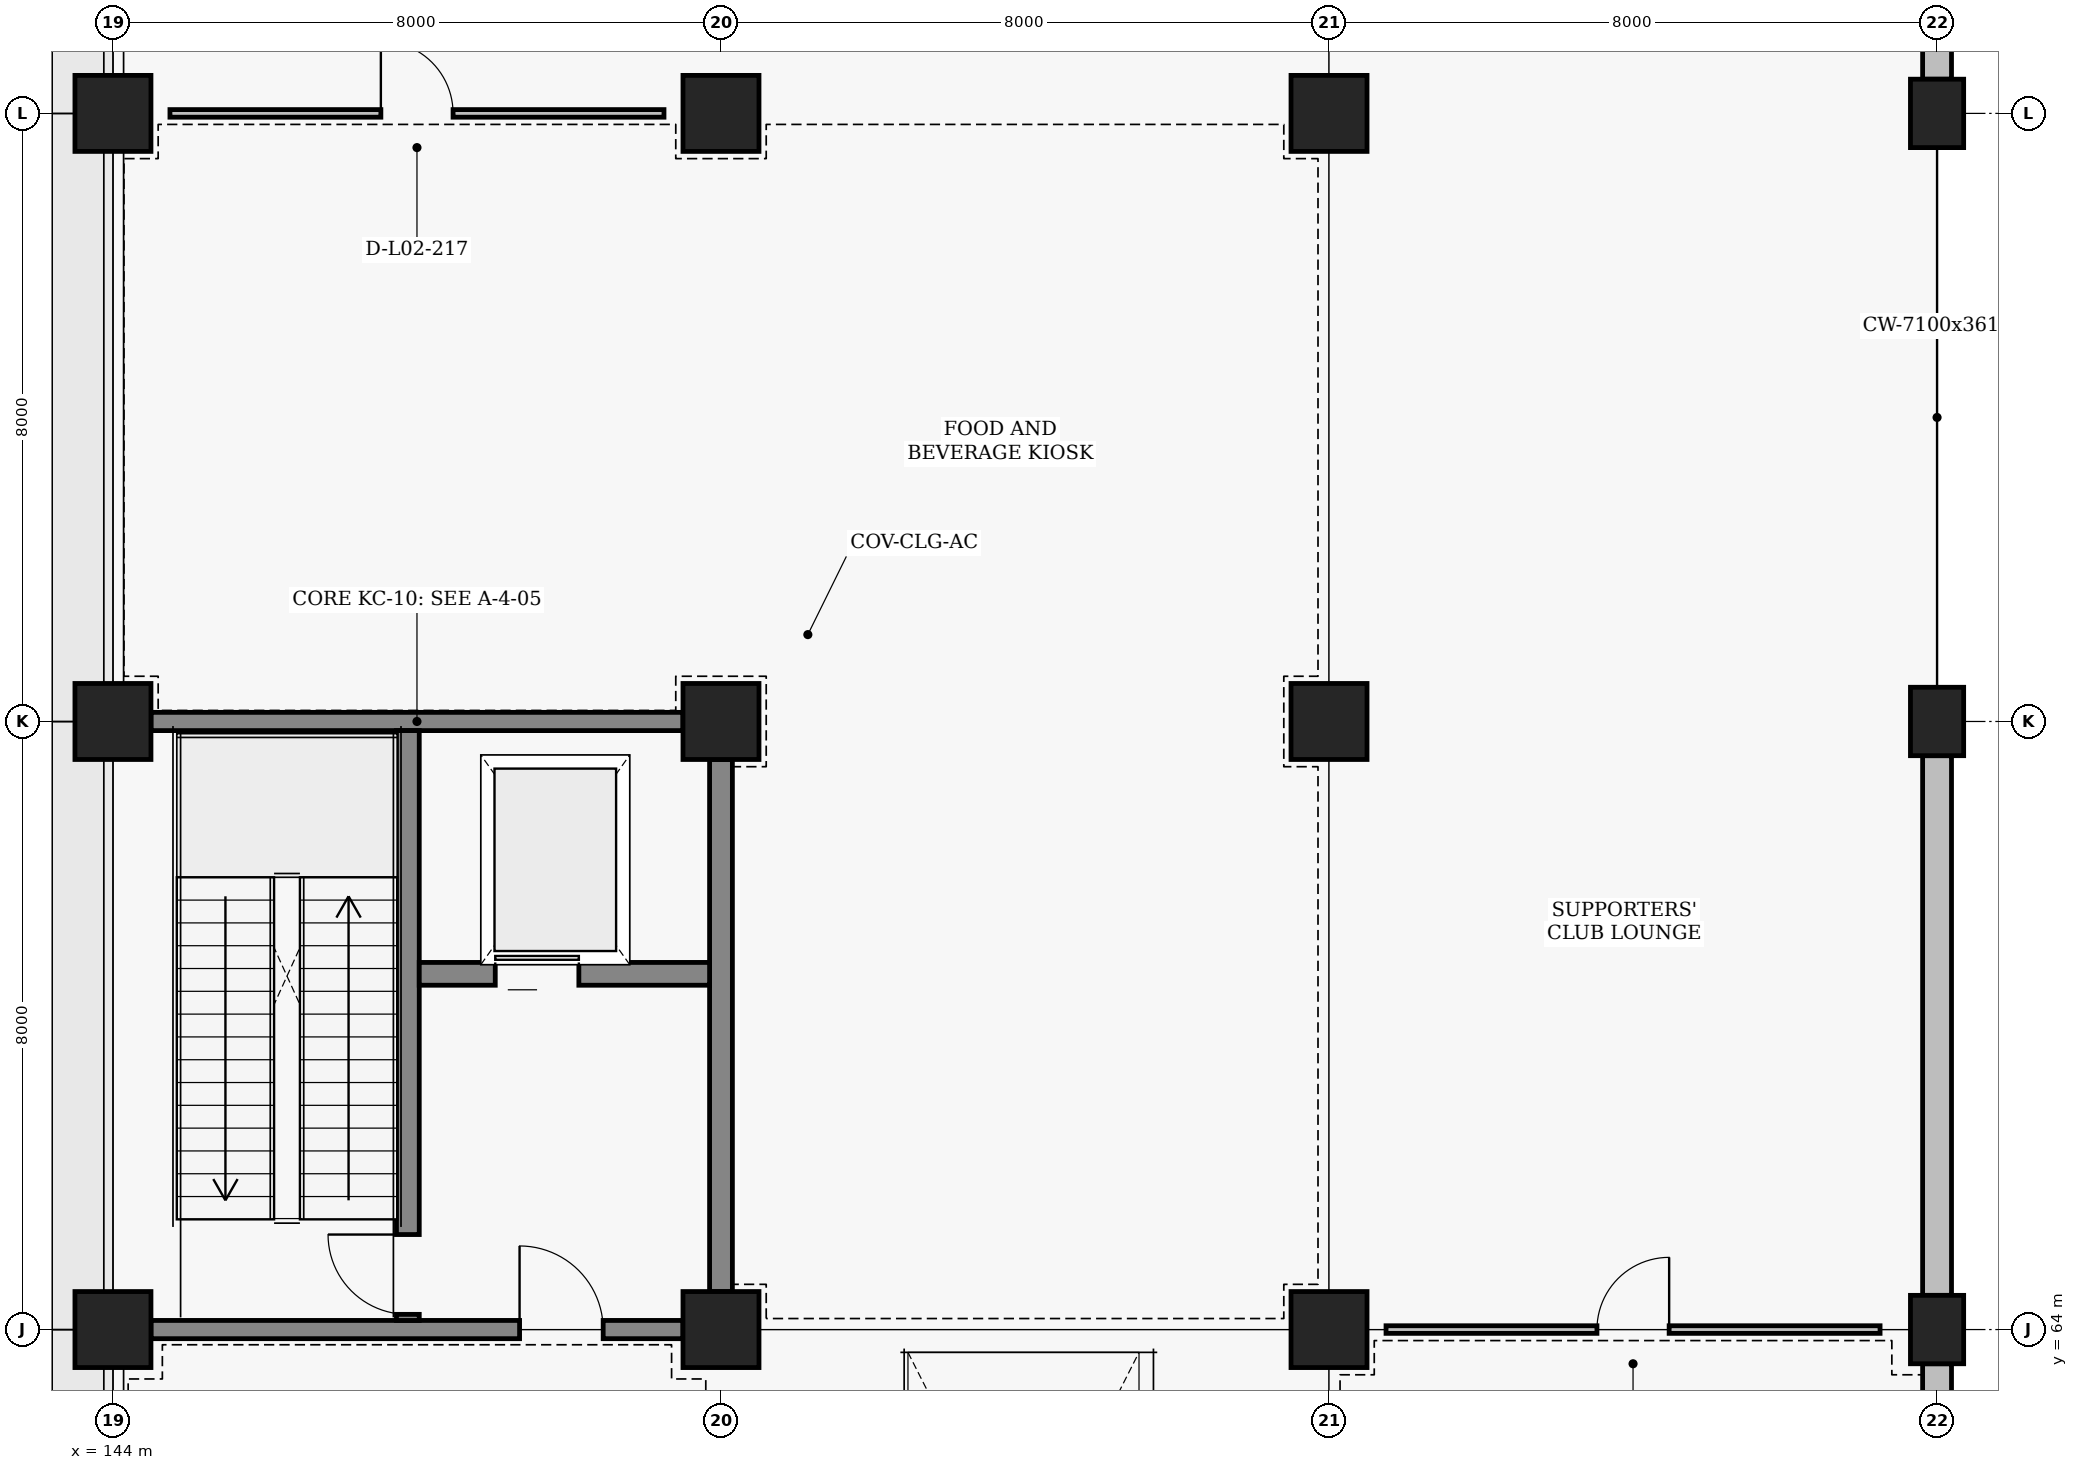
"""IFC4 building model, lengths in metres.
Left out: names, types, materials, properties, quantities, classifications, styles, units other than length and angle.
Written with IfcOpenShell. Run it as: python <this file> out.ifc"""

import sys

from ifc_helpers import new_model, si_unit, direction, frame, frame_2d, origin, origin_2d, place, context, subcontext, project, spatial, rectangle, extrude, element, fill, save


model = new_model("IFC4")
c1 = context("Model", 3, precision=1e-05, world=origin(), true_north=direction((0.0, 1.0)))
c2 = subcontext(c1, "Body", "Model", "MODEL_VIEW")
j1 = project(units=[si_unit("LENGTHUNIT", "METRE"), si_unit("PLANEANGLEUNIT", "RADIAN")], contexts=[c1])
p1 = place(None, origin())
s1 = spatial("IfcSite", under=j1, at=p1, CompositionType="ELEMENT")
p2 = place(p1, origin())
s2 = spatial("IfcBuilding", under=s1, at=p2, CompositionType="ELEMENT")
p3 = place(p2, frame((0.0, 0.0, 4.8)))
s3 = spatial("IfcBuildingStorey", under=s2, at=p3, CompositionType="ELEMENT", Elevation=4.8)
for number, where, z_axis, x_axis in (
    (1, (144.0, 64.0, 0.0), (0.0, 0.0, 1.0), (1.0, 0.0, 0.0)),
    (2, (144.0, 72.0, 0.0), (0.0, 0.0, 1.0), (1.0, 0.0, 0.0)),
    (3, (144.0, 80.0, 0.0), (0.0, 0.0, 1.0), (1.0, 0.0, 0.0)),
    (4, (152.0, 64.0, 0.0), (0.0, 0.0, 1.0), (1.0, 0.0, 0.0)),
    (5, (152.0, 72.0, 0.0), (0.0, 0.0, 1.0), (1.0, 0.0, 0.0)),
    (6, (152.0, 80.0, 0.0), (0.0, 0.0, 1.0), (1.0, 0.0, 0.0)),
    (7, (160.0, 64.0, 0.0), (0.0, 0.0, 1.0), (1.0, 0.0, 0.0)),
    (8, (160.0, 72.0, 0.0), (0.0, 0.0, 1.0), (1.0, 0.0, 0.0)),
    (9, (160.0, 80.0, 0.0), (0.0, 0.0, 1.0), (1.0, 0.0, 0.0)),
):
    element("IfcColumn", number, at=place(p3, frame(where, z_axis=z_axis, x_axis=x_axis)), inside=s3, PredefinedType="COLUMN", context=c2, shape_type="SweptSolid", body=[
        extrude(rectangle(XDim=1.0, YDim=1.0, at=origin_2d()), origin(), (0.0, 0.0, 1.0), 4.8),
    ])
for number, where, z_axis, x_axis in (
    (10, (168.0, 64.0, 0.0), (0.0, 0.0, 1.0), (1.0, 0.0, 0.0)),
    (11, (168.0, 72.0, 0.0), (0.0, 0.0, 1.0), (1.0, 0.0, 0.0)),
    (12, (168.0, 80.0, 0.0), (0.0, 0.0, 1.0), (1.0, 0.0, 0.0)),
):
    element("IfcColumn", number, at=place(p3, frame(where, z_axis=z_axis, x_axis=x_axis)), inside=s3, PredefinedType="COLUMN", context=c2, shape_type="SweptSolid", body=[
        extrude(rectangle(XDim=0.7, YDim=0.9, at=origin_2d()), origin(), (0.0, 0.0, 1.0), 4.8),
    ])
p4 = place(p3, frame((168.0, 56.45, 0.0), z_axis=(0.0, 0.0, 1.0), x_axis=(0.0, 1.0, 0.0)))
e13 = element("IfcWall", 13, at=p4, inside=s3, PredefinedType="SOLIDWALL", context=c2, shape_type="SweptSolid", body=[
    extrude(rectangle(XDim=7.1, YDim=0.38, at=frame_2d((3.55, 0.0))), origin(), (0.0, 0.0, 1.0), 3.91),
])
p5 = place(p4, frame((2.65, 0.0, 0.95)))
e14 = element("IfcOpeningElement", 14, at=p5, cuts=e13, PredefinedType="OPENING", context=c2, shape_type="SweptSolid", body=[
    extrude(rectangle(XDim=1.8, YDim=1.8, at=frame_2d((0.9, 0.9))), frame((0.0, 0.2, 0.0), z_axis=(0.0, -1.0, 0.0), x_axis=(1.0, 0.0, 0.0)), (0.0, 0.0, 1.0), 0.4),
])
p6 = place(p3, frame((168.0, 64.45, 0.0), z_axis=(0.0, 0.0, 1.0), x_axis=(0.0, 1.0, 0.0)))
e15 = element("IfcWall", 15, at=p6, inside=s3, PredefinedType="SOLIDWALL", context=c2, shape_type="SweptSolid", body=[
    extrude(rectangle(XDim=7.1, YDim=0.38, at=frame_2d((3.55, 0.0))), origin(), (0.0, 0.0, 1.0), 3.91),
])
p7 = place(p3, frame((168.0, 80.45, 0.0), z_axis=(0.0, 0.0, 1.0), x_axis=(0.0, 1.0, 0.0)))
e16 = element("IfcWall", 16, at=p7, inside=s3, PredefinedType="SOLIDWALL", context=c2, shape_type="SweptSolid", body=[
    extrude(rectangle(XDim=7.1, YDim=0.38, at=frame_2d((3.55, 0.0))), origin(), (0.0, 0.0, 1.0), 3.61),
])
p8 = place(p3, frame((144.5, 64.0, 0.0), z_axis=(0.0, 0.0, 1.0), x_axis=(1.0, 0.0, 0.0)))
e17 = element("IfcWall", 17, at=p8, inside=s3, PredefinedType="SHEAR", context=c2, shape_type="SweptSolid", body=[
    extrude(rectangle(XDim=7.0, YDim=0.24, at=frame_2d((3.5, 0.0))), origin(), (0.0, 0.0, 1.0), 3.91),
])
p9 = place(p8, frame((4.85, 0.0, 0.0)))
e18 = element("IfcOpeningElement", 18, at=p9, cuts=e17, PredefinedType="OPENING", context=c2, shape_type="SweptSolid", body=[
    extrude(rectangle(XDim=1.1, YDim=2.2, at=frame_2d((0.55, 1.1))), frame((0.0, 0.13, 0.0), z_axis=(0.0, -1.0, 0.0), x_axis=(1.0, 0.0, 0.0)), (0.0, 0.0, 1.0), 0.26),
])
p10 = place(p3, frame((144.5, 72.0, 0.0), z_axis=(0.0, 0.0, 1.0), x_axis=(1.0, 0.0, 0.0)))
e19 = element("IfcWall", 19, at=p10, inside=s3, PredefinedType="SHEAR", context=c2, shape_type="SweptSolid", body=[
    extrude(rectangle(XDim=7.0, YDim=0.24, at=frame_2d((3.5, 0.0))), origin(), (0.0, 0.0, 1.0), 3.91),
])
p11 = place(p3, frame((152.0, 64.5, 0.0), z_axis=(0.0, 0.0, 1.0), x_axis=(0.0, 1.0, 0.0)))
e20 = element("IfcWall", 20, at=p11, inside=s3, PredefinedType="SHEAR", context=c2, shape_type="SweptSolid", body=[
    extrude(rectangle(XDim=7.0, YDim=0.3, at=frame_2d((3.5, 0.0))), origin(), (0.0, 0.0, 1.0), 3.91),
])
p12 = place(p3, frame((147.88, 64.12, 0.0), z_axis=(0.0, 0.0, 1.0), x_axis=(0.0, 1.0, 0.0)))
e21 = element("IfcWall", 21, at=p12, inside=s3, PredefinedType="SHEAR", context=c2, shape_type="SweptSolid", body=[
    extrude(rectangle(XDim=7.76, YDim=0.3, at=frame_2d((3.88, 0.0))), origin(), (0.0, 0.0, 1.0), 4.01),
])
p13 = place(p12, frame((0.08, 0.0, 0.0)))
e22 = element("IfcOpeningElement", 22, at=p13, cuts=e21, PredefinedType="OPENING", context=c2, shape_type="SweptSolid", body=[
    extrude(rectangle(XDim=1.05, YDim=2.15, at=frame_2d((0.525, 1.075))), frame((0.0, 0.16, 0.0), z_axis=(0.0, -1.0, 0.0), x_axis=(1.0, 0.0, 0.0)), (0.0, 0.0, 1.0), 0.32),
])
p14 = place(p3, frame((148.03, 68.68, 0.0), z_axis=(0.0, 0.0, 1.0), x_axis=(1.0, 0.0, 0.0)))
e23 = element("IfcWall", 23, at=p14, inside=s3, PredefinedType="SHEAR", context=c2, shape_type="SweptSolid", body=[
    extrude(rectangle(XDim=3.82, YDim=0.3, at=frame_2d((1.91, 0.0))), origin(), (0.0, 0.0, 1.0), 3.91),
])
p15 = place(p14, frame((1.0, 0.0, 0.0)))
e24 = element("IfcOpeningElement", 24, at=p15, cuts=e23, PredefinedType="OPENING", context=c2, shape_type="SweptSolid", body=[
    extrude(rectangle(XDim=1.1, YDim=2.15, at=frame_2d((0.55, 1.075))), frame((0.0, 0.16, 0.0), z_axis=(0.0, -1.0, 0.0), x_axis=(1.0, 0.0, 0.0)), (0.0, 0.0, 1.0), 0.32),
])
p16 = place(p3, frame((144.75, 80.0, 0.0), z_axis=(0.0, 0.0, 1.0), x_axis=(1.0, 0.0, 0.0)))
e25 = element("IfcWall", 25, at=p16, inside=s3, PredefinedType="PARTITIONING", context=c2, shape_type="SweptSolid", body=[
    extrude(rectangle(XDim=6.5, YDim=0.1, at=frame_2d((3.25, 0.0))), origin(), (0.0, 0.0, 1.0), 3.91),
])
p17 = place(p16, frame((2.775, 0.0, 0.0)))
e26 = element("IfcOpeningElement", 26, at=p17, cuts=e25, PredefinedType="OPENING", context=c2, shape_type="SweptSolid", body=[
    extrude(rectangle(XDim=0.95, YDim=2.1, at=frame_2d((0.475, 1.05))), frame((0.0, 0.06, 0.0), z_axis=(0.0, -1.0, 0.0), x_axis=(1.0, 0.0, 0.0)), (0.0, 0.0, 1.0), 0.12),
])
p18 = place(p3, frame((160.75, 64.0, 0.0), z_axis=(0.0, 0.0, 1.0), x_axis=(1.0, 0.0, 0.0)))
e27 = element("IfcWall", 27, at=p18, inside=s3, PredefinedType="PARTITIONING", context=c2, shape_type="SweptSolid", body=[
    extrude(rectangle(XDim=6.5, YDim=0.1, at=frame_2d((3.25, 0.0))), origin(), (0.0, 0.0, 1.0), 3.91),
])
p19 = place(p18, frame((2.775, 0.0, 0.0)))
e28 = element("IfcOpeningElement", 28, at=p19, cuts=e27, PredefinedType="OPENING", context=c2, shape_type="SweptSolid", body=[
    extrude(rectangle(XDim=0.95, YDim=2.1, at=frame_2d((0.475, 1.05))), frame((0.0, 0.06, 0.0), z_axis=(0.0, -1.0, 0.0), x_axis=(1.0, 0.0, 0.0)), (0.0, 0.0, 1.0), 0.12),
])
p20 = place(p9, origin())
e29 = element("IfcDoor", 29, at=p20, inside=s3, OperationType="SINGLE_SWING_LEFT", PredefinedType="DOOR", context=c2, shape_type="SweptSolid", body=[
    extrude(rectangle(XDim=1.1, YDim=2.2, at=frame_2d((0.55, 1.1))), frame((0.0, 0.025, 0.0), z_axis=(0.0, -1.0, 0.0), x_axis=(1.0, 0.0, 0.0)), (0.0, 0.0, 1.0), 0.05),
])
fill(e18, e29)
p21 = place(p13, origin())
e30 = element("IfcDoor", 30, at=p21, inside=s3, OperationType="SINGLE_SWING_RIGHT", PredefinedType="DOOR", context=c2, shape_type="SweptSolid", body=[
    extrude(rectangle(XDim=1.05, YDim=2.15, at=frame_2d((0.525, 1.075))), frame((0.0, 0.025, 0.0), z_axis=(0.0, -1.0, 0.0), x_axis=(1.0, 0.0, 0.0)), (0.0, 0.0, 1.0), 0.05),
])
fill(e22, e30)
p22 = place(p15, origin())
e31 = element("IfcDoor", 31, at=p22, inside=s3, OperationType="SLIDING_TO_LEFT", PredefinedType="DOOR", context=c2, shape_type="SweptSolid", body=[
    extrude(rectangle(XDim=1.1, YDim=2.15, at=frame_2d((0.55, 1.075))), frame((0.0, 0.025, 0.0), z_axis=(0.0, -1.0, 0.0), x_axis=(1.0, 0.0, 0.0)), (0.0, 0.0, 1.0), 0.05),
])
fill(e24, e31)
p23 = place(p17, origin())
e32 = element("IfcDoor", 32, at=p23, inside=s3, OperationType="SINGLE_SWING_LEFT", PredefinedType="DOOR", context=c2, shape_type="SweptSolid", body=[
    extrude(rectangle(XDim=0.95, YDim=2.1, at=frame_2d((0.475, 1.05))), frame((0.0, 0.025, 0.0), z_axis=(0.0, -1.0, 0.0), x_axis=(1.0, 0.0, 0.0)), (0.0, 0.0, 1.0), 0.05),
])
fill(e26, e32)
p24 = place(p19, origin())
e33 = element("IfcDoor", 33, at=p24, inside=s3, OperationType="SINGLE_SWING_RIGHT", PredefinedType="DOOR", context=c2, shape_type="SweptSolid", body=[
    extrude(rectangle(XDim=0.95, YDim=2.1, at=frame_2d((0.475, 1.05))), frame((0.0, 0.025, 0.0), z_axis=(0.0, -1.0, 0.0), x_axis=(1.0, 0.0, 0.0)), (0.0, 0.0, 1.0), 0.05),
])
fill(e28, e33)
save(model, sys.argv[1])
